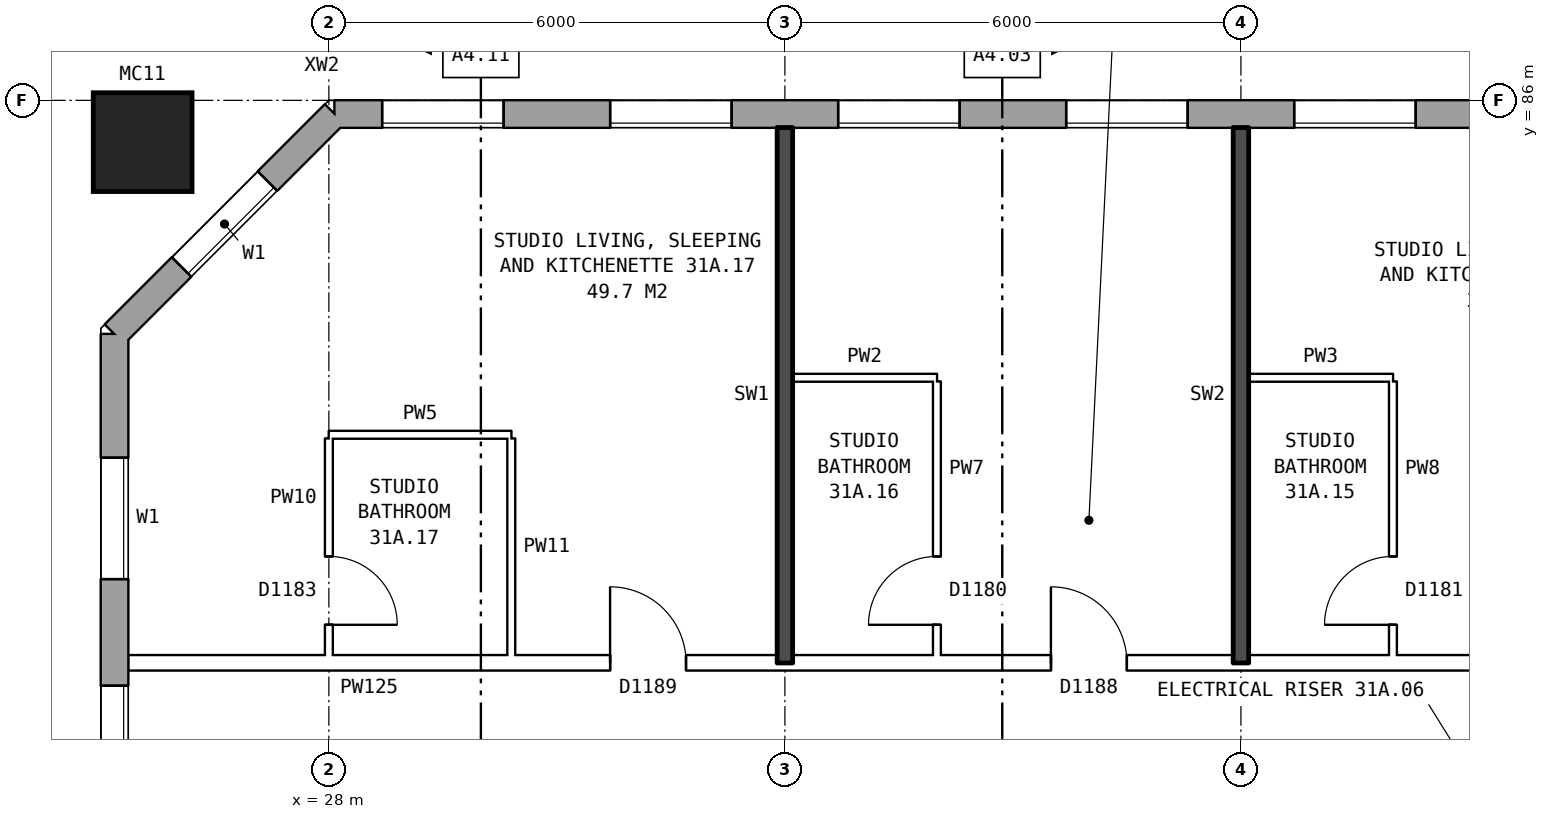
"""IFC4 building model, lengths in metres.
Left out: names, types, materials, properties, quantities, classifications, styles, units other than length and angle.
Written with IfcOpenShell. Run it as: python <this file> out.ifc"""

import sys

from ifc_helpers import new_model, si_unit, direction, frame, frame_2d, origin, origin_2d, place, context, subcontext, project, spatial, rectangle, hollow_rectangle, extrude, element, fill, save


model = new_model("IFC4")
c1 = context("Model", 3, precision=1e-05, world=origin(), true_north=direction((0.0, 1.0)))
c2 = subcontext(c1, "Body", "Model", "MODEL_VIEW")
j1 = project(units=[si_unit("LENGTHUNIT", "METRE"), si_unit("PLANEANGLEUNIT", "RADIAN")], contexts=[c1])
p1 = place(None, origin())
s1 = spatial("IfcSite", under=j1, at=p1, CompositionType="ELEMENT")
p2 = place(p1, origin())
s2 = spatial("IfcBuilding", under=s1, at=p2, CompositionType="ELEMENT")
p3 = place(p2, frame((0.0, 0.0, 111.9)))
s3 = spatial("IfcBuildingStorey", under=s2, at=p3, CompositionType="ELEMENT", Elevation=111.9)
p4 = place(p3, frame((25.55, 85.45, 0.0), z_axis=(0.0, 0.0, 1.0), x_axis=(1.0, 0.0, 0.0)))
e1 = element("IfcColumn", 1, at=p4, inside=s3, PredefinedType="COLUMN", context=c2, shape_type="SweptSolid", body=[
    extrude(hollow_rectangle(XDim=1.3, YDim=1.3, WallThickness=0.07, at=origin_2d()), origin(), (0.0, 0.0, 1.0), 3.1),
])
p5 = place(p3, frame((72.925, 85.82, 0.0), z_axis=(0.0, 0.0, 1.0), x_axis=(-1.0, 0.0, 0.0)))
e2 = element("IfcWall", 2, at=p5, inside=s3, PredefinedType="STANDARD", context=c2, shape_type="SweptSolid", body=[
    extrude(rectangle(XDim=44.851, YDim=0.36, at=frame_2d((22.425, 0.0))), origin(), (0.0, 0.0, 1.0), 2.85),
])
p6 = place(p5, frame((0.625, 0.0, 0.8)))
e3 = element("IfcOpeningElement", 3, at=p6, cuts=e2, PredefinedType="OPENING", context=c2, shape_type="SweptSolid", body=[
    extrude(rectangle(XDim=1.6, YDim=1.8, at=frame_2d((0.8, 0.9))), frame((0.0, 0.19, 0.0), z_axis=(0.0, -1.0, 0.0), x_axis=(1.0, 0.0, 0.0)), (0.0, 0.0, 1.0), 0.38),
])
p7 = place(p5, frame((3.625, 0.0, 0.8)))
e4 = element("IfcOpeningElement", 4, at=p7, cuts=e2, PredefinedType="OPENING", context=c2, shape_type="SweptSolid", body=[
    extrude(rectangle(XDim=1.6, YDim=1.8, at=frame_2d((0.8, 0.9))), frame((0.0, 0.19, 0.0), z_axis=(0.0, -1.0, 0.0), x_axis=(1.0, 0.0, 0.0)), (0.0, 0.0, 1.0), 0.38),
])
p8 = place(p5, frame((6.625, 0.0, 0.8)))
e5 = element("IfcOpeningElement", 5, at=p8, cuts=e2, PredefinedType="OPENING", context=c2, shape_type="SweptSolid", body=[
    extrude(rectangle(XDim=1.6, YDim=1.8, at=frame_2d((0.8, 0.9))), frame((0.0, 0.19, 0.0), z_axis=(0.0, -1.0, 0.0), x_axis=(1.0, 0.0, 0.0)), (0.0, 0.0, 1.0), 0.38),
])
p9 = place(p5, frame((9.625, 0.0, 0.8)))
e6 = element("IfcOpeningElement", 6, at=p9, cuts=e2, PredefinedType="OPENING", context=c2, shape_type="SweptSolid", body=[
    extrude(rectangle(XDim=1.6, YDim=1.8, at=frame_2d((0.8, 0.9))), frame((0.0, 0.19, 0.0), z_axis=(0.0, -1.0, 0.0), x_axis=(1.0, 0.0, 0.0)), (0.0, 0.0, 1.0), 0.38),
])
p10 = place(p5, frame((12.625, 0.0, 0.8)))
e7 = element("IfcOpeningElement", 7, at=p10, cuts=e2, PredefinedType="OPENING", context=c2, shape_type="SweptSolid", body=[
    extrude(rectangle(XDim=1.6, YDim=1.8, at=frame_2d((0.8, 0.9))), frame((0.0, 0.19, 0.0), z_axis=(0.0, -1.0, 0.0), x_axis=(1.0, 0.0, 0.0)), (0.0, 0.0, 1.0), 0.38),
])
p11 = place(p5, frame((15.625, 0.0, 0.8)))
e8 = element("IfcOpeningElement", 8, at=p11, cuts=e2, PredefinedType="OPENING", context=c2, shape_type="SweptSolid", body=[
    extrude(rectangle(XDim=1.6, YDim=1.8, at=frame_2d((0.8, 0.9))), frame((0.0, 0.19, 0.0), z_axis=(0.0, -1.0, 0.0), x_axis=(1.0, 0.0, 0.0)), (0.0, 0.0, 1.0), 0.38),
])
p12 = place(p5, frame((18.125, 0.0, 0.8)))
e9 = element("IfcOpeningElement", 9, at=p12, cuts=e2, PredefinedType="OPENING", context=c2, shape_type="SweptSolid", body=[
    extrude(rectangle(XDim=1.0, YDim=1.8, at=frame_2d((0.5, 0.9))), frame((0.0, 0.19, 0.0), z_axis=(0.0, -1.0, 0.0), x_axis=(1.0, 0.0, 0.0)), (0.0, 0.0, 1.0), 0.38),
])
p13 = place(p5, frame((21.725, 0.0, 0.55)))
e10 = element("IfcOpeningElement", 10, at=p13, cuts=e2, PredefinedType="OPENING", context=c2, shape_type="SweptSolid", body=[
    extrude(rectangle(XDim=1.4, YDim=1.2, at=frame_2d((0.7, 0.6))), frame((0.0, 0.19, 0.0), z_axis=(0.0, -1.0, 0.0), x_axis=(1.0, 0.0, 0.0)), (0.0, 0.0, 1.0), 0.38),
])
p14 = place(p5, frame((24.425, 0.0, 1.7)))
e11 = element("IfcOpeningElement", 11, at=p14, cuts=e2, PredefinedType="OPENING", context=c2, shape_type="SweptSolid", body=[
    extrude(rectangle(XDim=1.0, YDim=0.9, at=frame_2d((0.5, 0.45))), frame((0.0, 0.19, 0.0), z_axis=(0.0, -1.0, 0.0), x_axis=(1.0, 0.0, 0.0)), (0.0, 0.0, 1.0), 0.38),
])
p15 = place(p5, frame((27.625, 0.0, 0.8)))
e12 = element("IfcOpeningElement", 12, at=p15, cuts=e2, PredefinedType="OPENING", context=c2, shape_type="SweptSolid", body=[
    extrude(rectangle(XDim=1.6, YDim=1.8, at=frame_2d((0.8, 0.9))), frame((0.0, 0.19, 0.0), z_axis=(0.0, -1.0, 0.0), x_axis=(1.0, 0.0, 0.0)), (0.0, 0.0, 1.0), 0.38),
])
p16 = place(p5, frame((30.625, 0.0, 0.8)))
e13 = element("IfcOpeningElement", 13, at=p16, cuts=e2, PredefinedType="OPENING", context=c2, shape_type="SweptSolid", body=[
    extrude(rectangle(XDim=1.6, YDim=1.8, at=frame_2d((0.8, 0.9))), frame((0.0, 0.19, 0.0), z_axis=(0.0, -1.0, 0.0), x_axis=(1.0, 0.0, 0.0)), (0.0, 0.0, 1.0), 0.38),
])
p17 = place(p5, frame((33.625, 0.0, 0.8)))
e14 = element("IfcOpeningElement", 14, at=p17, cuts=e2, PredefinedType="OPENING", context=c2, shape_type="SweptSolid", body=[
    extrude(rectangle(XDim=1.6, YDim=1.8, at=frame_2d((0.8, 0.9))), frame((0.0, 0.19, 0.0), z_axis=(0.0, -1.0, 0.0), x_axis=(1.0, 0.0, 0.0)), (0.0, 0.0, 1.0), 0.38),
])
p18 = place(p5, frame((36.625, 0.0, 0.8)))
e15 = element("IfcOpeningElement", 15, at=p18, cuts=e2, PredefinedType="OPENING", context=c2, shape_type="SweptSolid", body=[
    extrude(rectangle(XDim=1.6, YDim=1.8, at=frame_2d((0.8, 0.9))), frame((0.0, 0.19, 0.0), z_axis=(0.0, -1.0, 0.0), x_axis=(1.0, 0.0, 0.0)), (0.0, 0.0, 1.0), 0.38),
])
p19 = place(p5, frame((39.625, 0.0, 0.8)))
e16 = element("IfcOpeningElement", 16, at=p19, cuts=e2, PredefinedType="OPENING", context=c2, shape_type="SweptSolid", body=[
    extrude(rectangle(XDim=1.6, YDim=1.8, at=frame_2d((0.8, 0.9))), frame((0.0, 0.19, 0.0), z_axis=(0.0, -1.0, 0.0), x_axis=(1.0, 0.0, 0.0)), (0.0, 0.0, 1.0), 0.38),
])
p20 = place(p5, frame((42.625, 0.0, 0.8)))
e17 = element("IfcOpeningElement", 17, at=p20, cuts=e2, PredefinedType="OPENING", context=c2, shape_type="SweptSolid", body=[
    extrude(rectangle(XDim=1.6, YDim=1.8, at=frame_2d((0.8, 0.9))), frame((0.0, 0.19, 0.0), z_axis=(0.0, -1.0, 0.0), x_axis=(1.0, 0.0, 0.0)), (0.0, 0.0, 1.0), 0.38),
])
p21 = place(p5, frame((19.425, 0.0, 1.7)))
e18 = element("IfcOpeningElement", 18, at=p21, cuts=e2, PredefinedType="OPENING", context=c2, shape_type="SweptSolid", body=[
    extrude(rectangle(XDim=1.0, YDim=0.9, at=frame_2d((0.5, 0.45))), frame((0.0, 0.19, 0.0), z_axis=(0.0, -1.0, 0.0), x_axis=(1.0, 0.0, 0.0)), (0.0, 0.0, 1.0), 0.38),
])
p22 = place(p5, frame((25.725, 0.0, 0.8)))
e19 = element("IfcOpeningElement", 19, at=p22, cuts=e2, PredefinedType="OPENING", context=c2, shape_type="SweptSolid", body=[
    extrude(rectangle(XDim=1.0, YDim=1.8, at=frame_2d((0.5, 0.9))), frame((0.0, 0.19, 0.0), z_axis=(0.0, -1.0, 0.0), x_axis=(1.0, 0.0, 0.0)), (0.0, 0.0, 1.0), 0.38),
])
p23 = place(p3, frame((28.075, 85.82, 0.0), z_axis=(0.0, 0.0, 1.0), x_axis=(-0.707106781187, -0.707106781187, 0.0)))
e20 = element("IfcWall", 20, at=p23, inside=s3, PredefinedType="STANDARD", context=c2, shape_type="SweptSolid", body=[
    extrude(rectangle(XDim=4.094, YDim=0.36, at=frame_2d((2.047, 0.0))), origin(), (0.0, 0.0, 1.0), 2.85),
])
p24 = place(p23, frame((1.247, 0.0, 0.8)))
e21 = element("IfcOpeningElement", 21, at=p24, cuts=e20, PredefinedType="OPENING", context=c2, shape_type="SweptSolid", body=[
    extrude(rectangle(XDim=1.6, YDim=1.8, at=frame_2d((0.8, 0.9))), frame((0.0, 0.19, 0.0), z_axis=(0.0, -1.0, 0.0), x_axis=(1.0, 0.0, 0.0)), (0.0, 0.0, 1.0), 0.38),
])
p25 = place(p3, frame((25.18, 82.925, 0.0), z_axis=(0.0, 0.0, 1.0), x_axis=(0.0, -1.0, 0.0)))
e22 = element("IfcWall", 22, at=p25, inside=s3, PredefinedType="STANDARD", context=c2, shape_type="SweptSolid", body=[
    extrude(rectangle(XDim=25.851, YDim=0.36, at=frame_2d((12.925, 0.0))), origin(), (0.0, 0.0, 1.0), 2.85),
])
p26 = place(p25, frame((1.625, 0.0, 0.8)))
e23 = element("IfcOpeningElement", 23, at=p26, cuts=e22, PredefinedType="OPENING", context=c2, shape_type="SweptSolid", body=[
    extrude(rectangle(XDim=1.6, YDim=1.8, at=frame_2d((0.8, 0.9))), frame((0.0, 0.19, 0.0), z_axis=(0.0, -1.0, 0.0), x_axis=(1.0, 0.0, 0.0)), (0.0, 0.0, 1.0), 0.38),
])
p27 = place(p25, frame((4.625, 0.0, 0.8)))
e24 = element("IfcOpeningElement", 24, at=p27, cuts=e22, PredefinedType="OPENING", context=c2, shape_type="SweptSolid", body=[
    extrude(rectangle(XDim=1.6, YDim=1.8, at=frame_2d((0.8, 0.9))), frame((0.0, 0.19, 0.0), z_axis=(0.0, -1.0, 0.0), x_axis=(1.0, 0.0, 0.0)), (0.0, 0.0, 1.0), 0.38),
])
p28 = place(p25, frame((7.625, 0.0, 0.8)))
e25 = element("IfcOpeningElement", 25, at=p28, cuts=e22, PredefinedType="OPENING", context=c2, shape_type="SweptSolid", body=[
    extrude(rectangle(XDim=1.6, YDim=1.8, at=frame_2d((0.8, 0.9))), frame((0.0, 0.19, 0.0), z_axis=(0.0, -1.0, 0.0), x_axis=(1.0, 0.0, 0.0)), (0.0, 0.0, 1.0), 0.38),
])
p29 = place(p25, frame((10.625, 0.0, 0.8)))
e26 = element("IfcOpeningElement", 26, at=p29, cuts=e22, PredefinedType="OPENING", context=c2, shape_type="SweptSolid", body=[
    extrude(rectangle(XDim=1.6, YDim=1.8, at=frame_2d((0.8, 0.9))), frame((0.0, 0.19, 0.0), z_axis=(0.0, -1.0, 0.0), x_axis=(1.0, 0.0, 0.0)), (0.0, 0.0, 1.0), 0.38),
])
p30 = place(p25, frame((13.625, 0.0, 0.8)))
e27 = element("IfcOpeningElement", 27, at=p30, cuts=e22, PredefinedType="OPENING", context=c2, shape_type="SweptSolid", body=[
    extrude(rectangle(XDim=1.6, YDim=1.8, at=frame_2d((0.8, 0.9))), frame((0.0, 0.19, 0.0), z_axis=(0.0, -1.0, 0.0), x_axis=(1.0, 0.0, 0.0)), (0.0, 0.0, 1.0), 0.38),
])
p31 = place(p25, frame((16.625, 0.0, 0.8)))
e28 = element("IfcOpeningElement", 28, at=p31, cuts=e22, PredefinedType="OPENING", context=c2, shape_type="SweptSolid", body=[
    extrude(rectangle(XDim=1.6, YDim=1.8, at=frame_2d((0.8, 0.9))), frame((0.0, 0.19, 0.0), z_axis=(0.0, -1.0, 0.0), x_axis=(1.0, 0.0, 0.0)), (0.0, 0.0, 1.0), 0.38),
])
p32 = place(p25, frame((19.625, 0.0, 0.8)))
e29 = element("IfcOpeningElement", 29, at=p32, cuts=e22, PredefinedType="OPENING", context=c2, shape_type="SweptSolid", body=[
    extrude(rectangle(XDim=1.6, YDim=1.8, at=frame_2d((0.8, 0.9))), frame((0.0, 0.19, 0.0), z_axis=(0.0, -1.0, 0.0), x_axis=(1.0, 0.0, 0.0)), (0.0, 0.0, 1.0), 0.38),
])
p33 = place(p25, frame((22.625, 0.0, 0.8)))
e30 = element("IfcOpeningElement", 30, at=p33, cuts=e22, PredefinedType="OPENING", context=c2, shape_type="SweptSolid", body=[
    extrude(rectangle(XDim=1.6, YDim=1.8, at=frame_2d((0.8, 0.9))), frame((0.0, 0.19, 0.0), z_axis=(0.0, -1.0, 0.0), x_axis=(1.0, 0.0, 0.0)), (0.0, 0.0, 1.0), 0.38),
])
p34 = place(p3, frame((25.36, 78.6, 0.0), z_axis=(0.0, 0.0, 1.0), x_axis=(1.0, 0.0, 0.0)))
e31 = element("IfcWall", 31, at=p34, inside=s3, PredefinedType="PARTITIONING", context=c2, shape_type="SweptSolid", body=[
    extrude(rectangle(XDim=20.54, YDim=0.2, at=frame_2d((10.27, 0.0))), origin(), (0.0, 0.0, 1.0), 2.85),
])
p35 = place(p34, frame((18.09, 0.0, 0.0)))
e32 = element("IfcOpeningElement", 32, at=p35, cuts=e31, PredefinedType="OPENING", context=c2, shape_type="SweptSolid", body=[
    extrude(rectangle(XDim=1.0, YDim=2.1, at=frame_2d((0.5, 1.05))), frame((0.0, 0.11, 0.0), z_axis=(0.0, -1.0, 0.0), x_axis=(1.0, 0.0, 0.0)), (0.0, 0.0, 1.0), 0.22),
])
p36 = place(p34, frame((12.14, 0.0, 0.0)))
e33 = element("IfcOpeningElement", 33, at=p36, cuts=e31, PredefinedType="OPENING", context=c2, shape_type="SweptSolid", body=[
    extrude(rectangle(XDim=1.0, YDim=2.1, at=frame_2d((0.5, 1.05))), frame((0.0, 0.11, 0.0), z_axis=(0.0, -1.0, 0.0), x_axis=(1.0, 0.0, 0.0)), (0.0, 0.0, 1.0), 0.22),
])
p37 = place(p34, frame((6.34, 0.0, 0.0)))
e34 = element("IfcOpeningElement", 34, at=p37, cuts=e31, PredefinedType="OPENING", context=c2, shape_type="SweptSolid", body=[
    extrude(rectangle(XDim=1.0, YDim=2.1, at=frame_2d((0.5, 1.05))), frame((0.0, 0.11, 0.0), z_axis=(0.0, -1.0, 0.0), x_axis=(1.0, 0.0, 0.0)), (0.0, 0.0, 1.0), 0.22),
])
p38 = place(p3, frame((28.0, 81.6, 0.0), z_axis=(0.0, 0.0, 1.0), x_axis=(1.0, 0.0, 0.0)))
e35 = element("IfcWall", 35, at=p38, inside=s3, PredefinedType="PARTITIONING", context=c2, shape_type="SweptSolid", body=[
    extrude(rectangle(XDim=2.4, YDim=0.1, at=frame_2d((1.2, 0.0))), origin(), (0.0, 0.0, 1.0), 2.85),
])
for number, where, z_axis, x_axis in (
    (36, (34.1, 82.35, 0.0), (0.0, 0.0, 1.0), (1.0, 0.0, 0.0)),
    (37, (40.1, 82.35, 0.0), (0.0, 0.0, 1.0), (1.0, 0.0, 0.0)),
):
    element("IfcWall", number, at=place(p3, frame(where, z_axis=z_axis, x_axis=x_axis)), inside=s3, PredefinedType="PARTITIONING", context=c2, shape_type="SweptSolid", body=[
        extrude(rectangle(XDim=1.9, YDim=0.1, at=frame_2d((0.95, 0.0))), origin(), (0.0, 0.0, 1.0), 2.85),
    ])
p39 = place(p3, frame((28.0, 78.7, 0.0), z_axis=(0.0, 0.0, 1.0), x_axis=(0.0, 1.0, 0.0)))
e38 = element("IfcWall", 38, at=p39, inside=s3, PredefinedType="PARTITIONING", context=c2, shape_type="SweptSolid", body=[
    extrude(rectangle(XDim=2.85, YDim=0.1, at=frame_2d((1.425, 0.0))), origin(), (0.0, 0.0, 1.0), 2.85),
])
p40 = place(p39, frame((0.4, 0.0, 0.0)))
e39 = element("IfcOpeningElement", 39, at=p40, cuts=e38, PredefinedType="OPENING", context=c2, shape_type="SweptSolid", body=[
    extrude(rectangle(XDim=0.9, YDim=2.1, at=frame_2d((0.45, 1.05))), frame((0.0, 0.06, 0.0), z_axis=(0.0, -1.0, 0.0), x_axis=(1.0, 0.0, 0.0)), (0.0, 0.0, 1.0), 0.12),
])
p41 = place(p3, frame((30.4, 78.7, 0.0), z_axis=(0.0, 0.0, 1.0), x_axis=(0.0, 1.0, 0.0)))
e40 = element("IfcWall", 40, at=p41, inside=s3, PredefinedType="PARTITIONING", context=c2, shape_type="SweptSolid", body=[
    extrude(rectangle(XDim=2.85, YDim=0.1, at=frame_2d((1.425, 0.0))), origin(), (0.0, 0.0, 1.0), 2.85),
])
p42 = place(p3, frame((34.0, 78.6, 0.0), z_axis=(0.0, 0.0, 1.0), x_axis=(0.0, 1.0, 0.0)))
e41 = element("IfcWall", 41, at=p42, inside=s3, PredefinedType="SOLIDWALL", context=c2, shape_type="SweptSolid", body=[
    extrude(rectangle(XDim=7.04, YDim=0.2, at=frame_2d((3.52, 0.0))), origin(), (0.0, 0.0, 1.0), 2.85),
])
p43 = place(p3, frame((36.0, 78.7, 0.0), z_axis=(0.0, 0.0, 1.0), x_axis=(0.0, 1.0, 0.0)))
e42 = element("IfcWall", 42, at=p43, inside=s3, PredefinedType="PARTITIONING", context=c2, shape_type="SweptSolid", body=[
    extrude(rectangle(XDim=3.6, YDim=0.1, at=frame_2d((1.8, 0.0))), origin(), (0.0, 0.0, 1.0), 2.85),
])
p44 = place(p43, frame((0.4, 0.0, 0.0)))
e43 = element("IfcOpeningElement", 43, at=p44, cuts=e42, PredefinedType="OPENING", context=c2, shape_type="SweptSolid", body=[
    extrude(rectangle(XDim=0.9, YDim=2.1, at=frame_2d((0.45, 1.05))), frame((0.0, 0.06, 0.0), z_axis=(0.0, -1.0, 0.0), x_axis=(1.0, 0.0, 0.0)), (0.0, 0.0, 1.0), 0.12),
])
p45 = place(p3, frame((40.0, 78.6, 0.0), z_axis=(0.0, 0.0, 1.0), x_axis=(0.0, 1.0, 0.0)))
e44 = element("IfcWall", 44, at=p45, inside=s3, PredefinedType="SOLIDWALL", context=c2, shape_type="SweptSolid", body=[
    extrude(rectangle(XDim=7.04, YDim=0.2, at=frame_2d((3.52, 0.0))), origin(), (0.0, 0.0, 1.0), 2.85),
])
p46 = place(p3, frame((42.0, 78.7, 0.0), z_axis=(0.0, 0.0, 1.0), x_axis=(0.0, 1.0, 0.0)))
e45 = element("IfcWall", 45, at=p46, inside=s3, PredefinedType="PARTITIONING", context=c2, shape_type="SweptSolid", body=[
    extrude(rectangle(XDim=3.6, YDim=0.1, at=frame_2d((1.8, 0.0))), origin(), (0.0, 0.0, 1.0), 2.85),
])
p47 = place(p46, frame((0.4, 0.0, 0.0)))
e46 = element("IfcOpeningElement", 46, at=p47, cuts=e45, PredefinedType="OPENING", context=c2, shape_type="SweptSolid", body=[
    extrude(rectangle(XDim=0.9, YDim=2.1, at=frame_2d((0.45, 1.05))), frame((0.0, 0.06, 0.0), z_axis=(0.0, -1.0, 0.0), x_axis=(1.0, 0.0, 0.0)), (0.0, 0.0, 1.0), 0.12),
])
p48 = place(p16, origin())
e47 = element("IfcWindow", 47, at=p48, inside=s3, PartitioningType="SINGLE_PANEL", PredefinedType="WINDOW", context=c2, shape_type="SweptSolid", body=[
    extrude(rectangle(XDim=1.6, YDim=1.8, at=frame_2d((0.8, 0.9))), frame((0.0, 0.15, 0.0), z_axis=(0.0, -1.0, 0.0), x_axis=(1.0, 0.0, 0.0)), (0.0, 0.0, 1.0), 0.06),
])
fill(e13, e47)
p49 = place(p17, origin())
e48 = element("IfcWindow", 48, at=p49, inside=s3, PartitioningType="SINGLE_PANEL", PredefinedType="WINDOW", context=c2, shape_type="SweptSolid", body=[
    extrude(rectangle(XDim=1.6, YDim=1.8, at=frame_2d((0.8, 0.9))), frame((0.0, 0.15, 0.0), z_axis=(0.0, -1.0, 0.0), x_axis=(1.0, 0.0, 0.0)), (0.0, 0.0, 1.0), 0.06),
])
fill(e14, e48)
p50 = place(p18, origin())
e49 = element("IfcWindow", 49, at=p50, inside=s3, PartitioningType="SINGLE_PANEL", PredefinedType="WINDOW", context=c2, shape_type="SweptSolid", body=[
    extrude(rectangle(XDim=1.6, YDim=1.8, at=frame_2d((0.8, 0.9))), frame((0.0, 0.15, 0.0), z_axis=(0.0, -1.0, 0.0), x_axis=(1.0, 0.0, 0.0)), (0.0, 0.0, 1.0), 0.06),
])
fill(e15, e49)
p51 = place(p19, origin())
e50 = element("IfcWindow", 50, at=p51, inside=s3, PartitioningType="SINGLE_PANEL", PredefinedType="WINDOW", context=c2, shape_type="SweptSolid", body=[
    extrude(rectangle(XDim=1.6, YDim=1.8, at=frame_2d((0.8, 0.9))), frame((0.0, 0.15, 0.0), z_axis=(0.0, -1.0, 0.0), x_axis=(1.0, 0.0, 0.0)), (0.0, 0.0, 1.0), 0.06),
])
fill(e16, e50)
p52 = place(p20, origin())
e51 = element("IfcWindow", 51, at=p52, inside=s3, PartitioningType="SINGLE_PANEL", PredefinedType="WINDOW", context=c2, shape_type="SweptSolid", body=[
    extrude(rectangle(XDim=1.6, YDim=1.8, at=frame_2d((0.8, 0.9))), frame((0.0, 0.15, 0.0), z_axis=(0.0, -1.0, 0.0), x_axis=(1.0, 0.0, 0.0)), (0.0, 0.0, 1.0), 0.06),
])
fill(e17, e51)
p53 = place(p24, origin())
e52 = element("IfcWindow", 52, at=p53, inside=s3, PartitioningType="SINGLE_PANEL", PredefinedType="WINDOW", context=c2, shape_type="SweptSolid", body=[
    extrude(rectangle(XDim=1.6, YDim=1.8, at=frame_2d((0.8, 0.9))), frame((0.0, 0.15, 0.0), z_axis=(0.0, -1.0, 0.0), x_axis=(1.0, 0.0, 0.0)), (0.0, 0.0, 1.0), 0.06),
])
fill(e21, e52)
p54 = place(p26, origin())
e53 = element("IfcWindow", 53, at=p54, inside=s3, PartitioningType="SINGLE_PANEL", PredefinedType="WINDOW", context=c2, shape_type="SweptSolid", body=[
    extrude(rectangle(XDim=1.6, YDim=1.8, at=frame_2d((0.8, 0.9))), frame((0.0, 0.15, 0.0), z_axis=(0.0, -1.0, 0.0), x_axis=(1.0, 0.0, 0.0)), (0.0, 0.0, 1.0), 0.06),
])
fill(e23, e53)
p55 = place(p27, origin())
e54 = element("IfcWindow", 54, at=p55, inside=s3, PartitioningType="SINGLE_PANEL", PredefinedType="WINDOW", context=c2, shape_type="SweptSolid", body=[
    extrude(rectangle(XDim=1.6, YDim=1.8, at=frame_2d((0.8, 0.9))), frame((0.0, 0.15, 0.0), z_axis=(0.0, -1.0, 0.0), x_axis=(1.0, 0.0, 0.0)), (0.0, 0.0, 1.0), 0.06),
])
fill(e24, e54)
p56 = place(p47, origin())
e55 = element("IfcDoor", 55, at=p56, inside=s3, OperationType="SINGLE_SWING_LEFT", PredefinedType="DOOR", context=c2, shape_type="SweptSolid", body=[
    extrude(rectangle(XDim=0.9, YDim=2.1, at=frame_2d((0.45, 1.05))), frame((0.0, 0.025, 0.0), z_axis=(0.0, -1.0, 0.0), x_axis=(1.0, 0.0, 0.0)), (0.0, 0.0, 1.0), 0.05),
])
fill(e46, e55)
p57 = place(p36, origin())
e56 = element("IfcDoor", 56, at=p57, inside=s3, OperationType="SINGLE_SWING_LEFT", PredefinedType="DOOR", context=c2, shape_type="SweptSolid", body=[
    extrude(rectangle(XDim=1.0, YDim=2.1, at=frame_2d((0.5, 1.05))), frame((0.0, 0.025, 0.0), z_axis=(0.0, -1.0, 0.0), x_axis=(1.0, 0.0, 0.0)), (0.0, 0.0, 1.0), 0.05),
])
fill(e33, e56)
p58 = place(p44, origin())
e57 = element("IfcDoor", 57, at=p58, inside=s3, OperationType="SINGLE_SWING_LEFT", PredefinedType="DOOR", context=c2, shape_type="SweptSolid", body=[
    extrude(rectangle(XDim=0.9, YDim=2.1, at=frame_2d((0.45, 1.05))), frame((0.0, 0.025, 0.0), z_axis=(0.0, -1.0, 0.0), x_axis=(1.0, 0.0, 0.0)), (0.0, 0.0, 1.0), 0.05),
])
fill(e43, e57)
p59 = place(p37, origin())
e58 = element("IfcDoor", 58, at=p59, inside=s3, OperationType="SINGLE_SWING_LEFT", PredefinedType="DOOR", context=c2, shape_type="SweptSolid", body=[
    extrude(rectangle(XDim=1.0, YDim=2.1, at=frame_2d((0.5, 1.05))), frame((0.0, 0.025, 0.0), z_axis=(0.0, -1.0, 0.0), x_axis=(1.0, 0.0, 0.0)), (0.0, 0.0, 1.0), 0.05),
])
fill(e34, e58)
p60 = place(p40, frame((0.9, 0.0, 0.0), z_axis=(0.0, 0.0, 1.0), x_axis=(-1.0, 0.0, 0.0)))
e59 = element("IfcDoor", 59, at=p60, inside=s3, OperationType="SINGLE_SWING_RIGHT", PredefinedType="DOOR", context=c2, shape_type="SweptSolid", body=[
    extrude(rectangle(XDim=0.9, YDim=2.1, at=frame_2d((0.45, 1.05))), frame((0.0, 0.025, 0.0), z_axis=(0.0, -1.0, 0.0), x_axis=(1.0, 0.0, 0.0)), (0.0, 0.0, 1.0), 0.05),
])
fill(e39, e59)
save(model, sys.argv[1])
